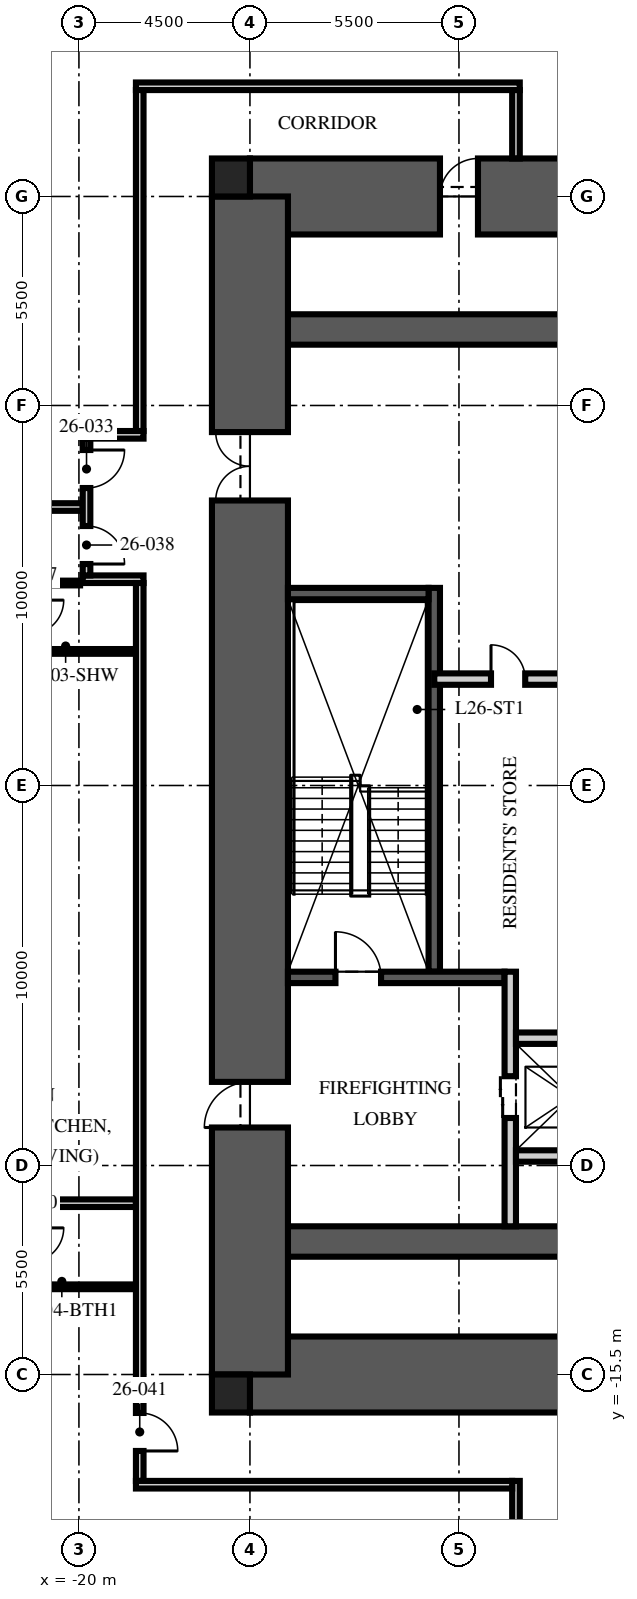
"""IFC4 building model, lengths in metres.
Left out: names, types, materials, properties, quantities, classifications, styles, units other than length and angle.
Written with IfcOpenShell. Run it as: python <this file> out.ifc"""

import sys

from ifc_helpers import new_model, si_unit, direction, frame, frame_2d, origin, origin_2d, place, context, subcontext, project, spatial, rectangle, extrude, element, fill, save


model = new_model("IFC4")
c1 = context("Model", 3, precision=1e-05, world=origin(), true_north=direction((0.0, 1.0)))
c2 = subcontext(c1, "Body", "Model", "MODEL_VIEW")
j1 = project(units=[si_unit("LENGTHUNIT", "METRE"), si_unit("PLANEANGLEUNIT", "RADIAN")], contexts=[c1])
p1 = place(None, origin())
s1 = spatial("IfcSite", under=j1, at=p1, CompositionType="ELEMENT")
p2 = place(p1, origin())
s2 = spatial("IfcBuilding", under=s1, at=p2, CompositionType="ELEMENT")
p3 = place(p2, frame((0.0, 0.0, 107.25)))
s3 = spatial("IfcBuildingStorey", under=s2, at=p3, CompositionType="ELEMENT", Elevation=107.25)
p4 = place(p3, frame((-15.5, 15.5, -0.25), z_axis=(0.0, 0.0, 1.0), x_axis=(1.0, 0.0, 0.0)))
e1 = element("IfcWall", 1, at=p4, inside=s3, PredefinedType="SHEAR", context=c2, shape_type="SweptSolid", body=[
    extrude(rectangle(XDim=31.0, YDim=2.0, at=frame_2d((15.5, 0.0))), origin(), (0.0, 0.0, 1.0), 3.75),
])
p5 = place(p4, frame((5.0, 0.0, 0.25)))
e2 = element("IfcOpeningElement", 2, at=p5, cuts=e1, PredefinedType="OPENING", context=c2, shape_type="SweptSolid", body=[
    extrude(rectangle(XDim=1.0, YDim=2.1, at=frame_2d((0.5, 1.05))), frame((0.0, 1.01, 0.0), z_axis=(0.0, -1.0, 0.0), x_axis=(1.0, 0.0, 0.0)), (0.0, 0.0, 1.0), 2.02),
])
p6 = place(p3, frame((-15.5, -15.5, -0.25), z_axis=(0.0, 0.0, 1.0), x_axis=(1.0, 0.0, 0.0)))
e3 = element("IfcWall", 3, at=p6, inside=s3, PredefinedType="SHEAR", context=c2, shape_type="SweptSolid", body=[
    extrude(rectangle(XDim=31.0, YDim=2.0, at=frame_2d((15.5, 0.0))), origin(), (0.0, 0.0, 1.0), 3.75),
])
p7 = place(p6, frame((10.4, 0.0, 0.25)))
e4 = element("IfcOpeningElement", 4, at=p7, cuts=e3, PredefinedType="OPENING", context=c2, shape_type="SweptSolid", body=[
    extrude(rectangle(XDim=1.1, YDim=2.1, at=frame_2d((0.55, 1.05))), frame((0.0, 1.01, 0.0), z_axis=(0.0, -1.0, 0.0), x_axis=(1.0, 0.0, 0.0)), (0.0, 0.0, 1.0), 2.02),
])
p8 = place(p6, frame((13.5, 0.0, 0.25)))
e5 = element("IfcOpeningElement", 5, at=p8, cuts=e3, PredefinedType="OPENING", context=c2, shape_type="SweptSolid", body=[
    extrude(rectangle(XDim=1.1, YDim=2.1, at=frame_2d((0.55, 1.05))), frame((0.0, 1.01, 0.0), z_axis=(0.0, -1.0, 0.0), x_axis=(1.0, 0.0, 0.0)), (0.0, 0.0, 1.0), 2.02),
])
p9 = place(p6, frame((16.6, 0.0, 0.25)))
e6 = element("IfcOpeningElement", 6, at=p9, cuts=e3, PredefinedType="OPENING", context=c2, shape_type="SweptSolid", body=[
    extrude(rectangle(XDim=1.1, YDim=2.1, at=frame_2d((0.55, 1.05))), frame((0.0, 1.01, 0.0), z_axis=(0.0, -1.0, 0.0), x_axis=(1.0, 0.0, 0.0)), (0.0, 0.0, 1.0), 2.02),
])
for number, where, z_axis, x_axis in (
    (7, (-15.5, 12.0, -0.25), (0.0, 0.0, 1.0), (1.0, 0.0, 0.0)),
    (8, (-15.5, -12.0, -0.25), (0.0, 0.0, 1.0), (1.0, 0.0, 0.0)),
):
    element("IfcWall", number, at=place(p3, frame(where, z_axis=z_axis, x_axis=x_axis)), inside=s3, PredefinedType="SHEAR", context=c2, shape_type="SweptSolid", body=[
        extrude(rectangle(XDim=31.0, YDim=0.8, at=frame_2d((15.5, 0.0))), origin(), (0.0, 0.0, 1.0), 3.75),
    ])
p10 = place(p3, frame((-15.5, -15.5, -0.25), z_axis=(0.0, 0.0, 1.0), x_axis=(0.0, 1.0, 0.0)))
e9 = element("IfcWall", 9, at=p10, inside=s3, PredefinedType="SHEAR", context=c2, shape_type="SweptSolid", body=[
    extrude(rectangle(XDim=31.0, YDim=2.0, at=frame_2d((15.5, 0.0))), origin(), (0.0, 0.0, 1.0), 3.75),
])
p11 = place(p10, frame((6.5, 0.0, 0.25)))
e10 = element("IfcOpeningElement", 10, at=p11, cuts=e9, PredefinedType="OPENING", context=c2, shape_type="SweptSolid", body=[
    extrude(rectangle(XDim=1.2, YDim=2.1, at=frame_2d((0.6, 1.05))), frame((0.0, 1.01, 0.0), z_axis=(0.0, -1.0, 0.0), x_axis=(1.0, 0.0, 0.0)), (0.0, 0.0, 1.0), 2.02),
])
p12 = place(p10, frame((23.0, 0.0, 0.25)))
e11 = element("IfcOpeningElement", 11, at=p12, cuts=e9, PredefinedType="OPENING", context=c2, shape_type="SweptSolid", body=[
    extrude(rectangle(XDim=1.8, YDim=2.1, at=frame_2d((0.9, 1.05))), frame((0.0, 1.01, 0.0), z_axis=(0.0, -1.0, 0.0), x_axis=(1.0, 0.0, 0.0)), (0.0, 0.0, 1.0), 2.02),
])
for number, where, z_axis, x_axis in (
    (12, (-16.0, 16.0, -0.25), (0.0, 0.0, 1.0), (1.0, 0.0, 0.0)),
    (13, (-16.0, -16.0, -0.25), (0.0, 0.0, 1.0), (1.0, 0.0, 0.0)),
):
    element("IfcColumn", number, at=place(p3, frame(where, z_axis=z_axis, x_axis=x_axis)), inside=s3, PredefinedType="COLUMN", context=c2, shape_type="SweptSolid", body=[
        extrude(rectangle(XDim=1.0, YDim=1.0, at=origin_2d()), origin(), (0.0, 0.0, 1.0), 3.75),
    ])
p13 = place(p3, frame((-10.65, -4.9, 0.0), z_axis=(0.0, 0.0, 1.0), x_axis=(0.0, 1.0, 0.0)))
e14 = element("IfcWall", 14, at=p13, inside=s3, PredefinedType="SOLIDWALL", context=c2, shape_type="SweptSolid", body=[
    extrude(rectangle(XDim=10.1, YDim=0.3, at=frame_2d((5.05, 0.0))), origin(), (0.0, 0.0, 1.0), 3.5),
])
p14 = place(p3, frame((-14.5, -5.05, 0.0), z_axis=(0.0, 0.0, 1.0), x_axis=(1.0, 0.0, 0.0)))
e15 = element("IfcWall", 15, at=p14, inside=s3, PredefinedType="SOLIDWALL", context=c2, shape_type="SweptSolid", body=[
    extrude(rectangle(XDim=5.7, YDim=0.3, at=frame_2d((2.85, 0.0))), origin(), (0.0, 0.0, 1.0), 3.5),
])
p15 = place(p14, frame((1.25, 0.0, 0.0)))
e16 = element("IfcOpeningElement", 16, at=p15, cuts=e15, PredefinedType="OPENING", context=c2, shape_type="SweptSolid", body=[
    extrude(rectangle(XDim=1.2, YDim=2.1, at=frame_2d((0.6, 1.05))), frame((0.0, 0.16, 0.0), z_axis=(0.0, -1.0, 0.0), x_axis=(1.0, 0.0, 0.0)), (0.0, 0.0, 1.0), 0.32),
])
p16 = place(p3, frame((-14.5, 5.05, 0.0), z_axis=(0.0, 0.0, 1.0), x_axis=(1.0, 0.0, 0.0)))
e17 = element("IfcWall", 17, at=p16, inside=s3, PredefinedType="SOLIDWALL", context=c2, shape_type="SweptSolid", body=[
    extrude(rectangle(XDim=3.7, YDim=0.3, at=frame_2d((1.85, 0.0))), origin(), (0.0, 0.0, 1.0), 3.5),
])
p17 = place(p3, frame((-8.65, -11.6, 0.0), z_axis=(0.0, 0.0, 1.0), x_axis=(0.0, 1.0, 0.0)))
e18 = element("IfcWall", 18, at=p17, inside=s3, PredefinedType="PARTITIONING", context=c2, shape_type="SweptSolid", body=[
    extrude(rectangle(XDim=6.7, YDim=0.3, at=frame_2d((3.35, 0.0))), origin(), (0.0, 0.0, 1.0), 3.5),
])
p18 = place(p17, frame((2.85, 0.0, 0.0)))
e19 = element("IfcOpeningElement", 19, at=p18, cuts=e18, PredefinedType="OPENING", context=c2, shape_type="SweptSolid", body=[
    extrude(rectangle(XDim=1.1, YDim=2.1, at=frame_2d((0.55, 1.05))), frame((0.0, 0.16, 0.0), z_axis=(0.0, -1.0, 0.0), x_axis=(1.0, 0.0, 0.0)), (0.0, 0.0, 1.0), 0.32),
])
p19 = place(p3, frame((-8.5, -6.65, 0.0), z_axis=(0.0, 0.0, 1.0), x_axis=(1.0, 0.0, 0.0)))
e20 = element("IfcWall", 20, at=p19, inside=s3, PredefinedType="PARTITIONING", context=c2, shape_type="SweptSolid", body=[
    extrude(rectangle(XDim=17.0, YDim=0.3, at=frame_2d((8.5, 0.0))), origin(), (0.0, 0.0, 1.0), 3.5),
])
p20 = place(p19, frame((7.8, 0.0, 0.0)))
e21 = element("IfcOpeningElement", 21, at=p20, cuts=e20, PredefinedType="OPENING", context=c2, shape_type="SweptSolid", body=[
    extrude(rectangle(XDim=1.3, YDim=2.4, at=frame_2d((0.65, 1.2))), frame((0.0, 0.16, 0.0), z_axis=(0.0, -1.0, 0.0), x_axis=(1.0, 0.0, 0.0)), (0.0, 0.0, 1.0), 0.32),
])
p21 = place(p19, frame((5.65, 0.0, 0.0)))
e22 = element("IfcOpeningElement", 22, at=p21, cuts=e20, PredefinedType="OPENING", context=c2, shape_type="SweptSolid", body=[
    extrude(rectangle(XDim=0.9, YDim=2.1, at=frame_2d((0.45, 1.05))), frame((0.0, 0.16, 0.0), z_axis=(0.0, -1.0, 0.0), x_axis=(1.0, 0.0, 0.0)), (0.0, 0.0, 1.0), 0.32),
])
p22 = place(p19, frame((10.4, 0.0, 0.0)))
e23 = element("IfcOpeningElement", 23, at=p22, cuts=e20, PredefinedType="OPENING", context=c2, shape_type="SweptSolid", body=[
    extrude(rectangle(XDim=0.9, YDim=2.1, at=frame_2d((0.45, 1.05))), frame((0.0, 0.16, 0.0), z_axis=(0.0, -1.0, 0.0), x_axis=(1.0, 0.0, 0.0)), (0.0, 0.0, 1.0), 0.32),
])
p23 = place(p3, frame((-8.5, -9.75, 0.0), z_axis=(0.0, 0.0, 1.0), x_axis=(1.0, 0.0, 0.0)))
e24 = element("IfcWall", 24, at=p23, inside=s3, PredefinedType="PARTITIONING", context=c2, shape_type="SweptSolid", body=[
    extrude(rectangle(XDim=2.9, YDim=0.3, at=frame_2d((1.45, 0.0))), origin(), (0.0, 0.0, 1.0), 3.5),
])
p24 = place(p3, frame((-10.65, 2.8, 0.0), z_axis=(0.0, 0.0, 1.0), x_axis=(1.0, 0.0, 0.0)))
e25 = element("IfcWall", 25, at=p24, inside=s3, PredefinedType="PARTITIONING", context=c2, shape_type="SweptSolid", body=[
    extrude(rectangle(XDim=21.3, YDim=0.3, at=frame_2d((10.65, 0.0))), origin(), (0.0, 0.0, 1.0), 3.5),
])
p25 = place(p24, frame((10.05, 0.0, 0.0)))
e26 = element("IfcOpeningElement", 26, at=p25, cuts=e25, PredefinedType="OPENING", context=c2, shape_type="SweptSolid", body=[
    extrude(rectangle(XDim=1.2, YDim=2.1, at=frame_2d((0.6, 1.05))), frame((0.0, 0.16, 0.0), z_axis=(0.0, -1.0, 0.0), x_axis=(1.0, 0.0, 0.0)), (0.0, 0.0, 1.0), 0.32),
])
p26 = place(p24, frame((1.493, 0.0, 0.0)))
e27 = element("IfcOpeningElement", 27, at=p26, cuts=e25, PredefinedType="OPENING", context=c2, shape_type="SweptSolid", body=[
    extrude(rectangle(XDim=0.9, YDim=2.1, at=frame_2d((0.45, 1.05))), frame((0.0, 0.16, 0.0), z_axis=(0.0, -1.0, 0.0), x_axis=(1.0, 0.0, 0.0)), (0.0, 0.0, 1.0), 0.32),
])
p27 = place(p24, frame((18.836, 0.0, 0.0)))
e28 = element("IfcOpeningElement", 28, at=p27, cuts=e25, PredefinedType="OPENING", context=c2, shape_type="SweptSolid", body=[
    extrude(rectangle(XDim=0.9, YDim=2.1, at=frame_2d((0.45, 1.05))), frame((0.0, 0.16, 0.0), z_axis=(0.0, -1.0, 0.0), x_axis=(1.0, 0.0, 0.0)), (0.0, 0.0, 1.0), 0.32),
])
p28 = place(p3, frame((-18.5, 18.4, 0.0), z_axis=(0.0, 0.0, 1.0), x_axis=(1.0, 0.0, 0.0)))
e29 = element("IfcWall", 29, at=p28, inside=s3, PredefinedType="PARTITIONING", context=c2, shape_type="SweptSolid", body=[
    extrude(rectangle(XDim=10.1, YDim=0.2, at=frame_2d((5.05, 0.0))), origin(), (0.0, 0.0, 1.0), 2.3),
])
p29 = place(p3, frame((-8.5, 18.3, 0.0), z_axis=(0.0, 0.0, 1.0), x_axis=(0.0, -1.0, 0.0)))
e30 = element("IfcWall", 30, at=p29, inside=s3, PredefinedType="PARTITIONING", context=c2, shape_type="SweptSolid", body=[
    extrude(rectangle(XDim=1.8, YDim=0.2, at=frame_2d((0.9, 0.0))), origin(), (0.0, 0.0, 1.0), 3.5),
])
p30 = place(p3, frame((-19.9, 7.328, 0.0), z_axis=(0.0, 0.0, 1.0), x_axis=(-1.0, 0.0, 0.0)))
e31 = element("IfcWall", 31, at=p30, inside=s3, PredefinedType="PARTITIONING", context=c2, shape_type="SweptSolid", body=[
    extrude(rectangle(XDim=9.25, YDim=0.2, at=frame_2d((4.625, 0.0))), origin(), (0.0, 0.0, 1.0), 2.81),
])
p31 = place(p3, frame((-18.5, -10.992, 0.0), z_axis=(0.0, 0.0, 1.0), x_axis=(-1.0, 0.0, 0.0)))
e32 = element("IfcWall", 32, at=p31, inside=s3, PredefinedType="PARTITIONING", context=c2, shape_type="SweptSolid", body=[
    extrude(rectangle(XDim=10.65, YDim=0.2, at=frame_2d((5.325, 0.0))), origin(), (0.0, 0.0, 1.0), 2.81),
])
p32 = place(p3, frame((-19.97, 5.328, 0.0), z_axis=(0.0, 0.0, 1.0), x_axis=(-1.0, 0.0, 0.0)))
e33 = element("IfcWall", 33, at=p32, inside=s3, PredefinedType="PARTITIONING", context=c2, shape_type="SweptSolid", body=[
    extrude(rectangle(XDim=1.33, YDim=0.125, at=frame_2d((0.665, 0.0))), origin(), (0.0, 0.0, 1.0), 3.5),
])
for number, where, z_axis, x_axis in (
    (34, (-18.5, 3.528, 0.0), (0.0, 0.0, 1.0), (-1.0, 0.0, 0.0)),
    (35, (-18.5, -13.192, 0.0), (0.0, 0.0, 1.0), (-1.0, 0.0, 0.0)),
):
    element("IfcWall", number, at=place(p3, frame(where, z_axis=z_axis, x_axis=x_axis)), inside=s3, PredefinedType="PARTITIONING", context=c2, shape_type="SweptSolid", body=[
        extrude(rectangle(XDim=2.8, YDim=0.125, at=frame_2d((1.4, 0.0))), origin(), (0.0, 0.0, 1.0), 3.5),
    ])
p33 = place(p3, frame((-18.4, 18.3, 0.0), z_axis=(0.0, 0.0, 1.0), x_axis=(0.0, -1.0, 0.0)))
e36 = element("IfcWall", 36, at=p33, inside=s3, PredefinedType="PARTITIONING", context=c2, shape_type="SweptSolid", body=[
    extrude(rectangle(XDim=8.972, YDim=0.2, at=frame_2d((4.486, 0.0))), origin(), (0.0, 0.0, 1.0), 2.3),
])
p34 = place(p3, frame((-18.3, 9.228, 0.0), z_axis=(0.0, 0.0, 1.0), x_axis=(-1.0, 0.0, 0.0)))
e37 = element("IfcWall", 37, at=p34, inside=s3, PredefinedType="PARTITIONING", context=c2, shape_type="SweptSolid", body=[
    extrude(rectangle(XDim=1.6, YDim=0.2, at=frame_2d((0.8, 0.0))), origin(), (0.0, 0.0, 1.0), 2.7),
])
p35 = place(p3, frame((-18.3, 5.428, 0.0), z_axis=(0.0, 0.0, 1.0), x_axis=(-1.0, 0.0, 0.0)))
e38 = element("IfcWall", 38, at=p35, inside=s3, PredefinedType="PARTITIONING", context=c2, shape_type="SweptSolid", body=[
    extrude(rectangle(XDim=1.6, YDim=0.2, at=frame_2d((0.8, 0.0))), origin(), (0.0, 0.0, 1.0), 3.5),
])
p36 = place(p3, frame((-19.8, 9.128, 0.0), z_axis=(0.0, 0.0, 1.0), x_axis=(0.0, -1.0, 0.0)))
e39 = element("IfcWall", 39, at=p36, inside=s3, PredefinedType="PARTITIONING", context=c2, shape_type="SweptSolid", body=[
    extrude(rectangle(XDim=3.6, YDim=0.2, at=frame_2d((1.8, 0.0))), origin(), (0.0, 0.0, 1.0), 2.7),
])
p37 = place(p36, frame((0.3, 0.0, 0.0)))
e40 = element("IfcOpeningElement", 40, at=p37, cuts=e39, PredefinedType="OPENING", context=c2, shape_type="SweptSolid", body=[
    extrude(rectangle(XDim=1.0, YDim=2.2, at=frame_2d((0.5, 1.1))), frame((0.0, 0.11, 0.0), z_axis=(0.0, -1.0, 0.0), x_axis=(1.0, 0.0, 0.0)), (0.0, 0.0, 1.0), 0.22),
])
p38 = place(p36, frame((2.3, 0.0, 0.0)))
e41 = element("IfcOpeningElement", 41, at=p38, cuts=e39, PredefinedType="OPENING", context=c2, shape_type="SweptSolid", body=[
    extrude(rectangle(XDim=1.0, YDim=2.2, at=frame_2d((0.5, 1.1))), frame((0.0, 0.11, 0.0), z_axis=(0.0, -1.0, 0.0), x_axis=(1.0, 0.0, 0.0)), (0.0, 0.0, 1.0), 0.22),
])
p39 = place(p3, frame((-18.4, 5.328, 0.0), z_axis=(0.0, 0.0, 1.0), x_axis=(0.0, -1.0, 0.0)))
e42 = element("IfcWall", 42, at=p39, inside=s3, PredefinedType="PARTITIONING", context=c2, shape_type="SweptSolid", body=[
    extrude(rectangle(XDim=23.628, YDim=0.2, at=frame_2d((11.814, 0.0))), origin(), (0.0, 0.0, 1.0), 2.3),
])
p40 = place(p39, frame((21.84, 0.0, 0.0)))
e43 = element("IfcOpeningElement", 43, at=p40, cuts=e42, PredefinedType="OPENING", context=c2, shape_type="SweptSolid", body=[
    extrude(rectangle(XDim=1.0, YDim=2.2, at=frame_2d((0.5, 1.1))), frame((0.0, 0.11, 0.0), z_axis=(0.0, -1.0, 0.0), x_axis=(1.0, 0.0, 0.0)), (0.0, 0.0, 1.0), 0.22),
])
p41 = place(p3, frame((-8.5, -18.3, 0.0), z_axis=(0.0, 0.0, 1.0), x_axis=(0.0, -1.0, 0.0)))
e44 = element("IfcWall", 44, at=p41, inside=s3, PredefinedType="PARTITIONING", context=c2, shape_type="SweptSolid", body=[
    extrude(rectangle(XDim=3.0, YDim=0.2, at=frame_2d((1.5, 0.0))), origin(), (0.0, 0.0, 1.0), 3.5),
])
p42 = place(p3, frame((-8.6, -18.4, 0.0), z_axis=(0.0, 0.0, 1.0), x_axis=(-1.0, 0.0, 0.0)))
e45 = element("IfcWall", 45, at=p42, inside=s3, PredefinedType="PARTITIONING", context=c2, shape_type="SweptSolid", body=[
    extrude(rectangle(XDim=9.9, YDim=0.2, at=frame_2d((4.95, 0.0))), origin(), (0.0, 0.0, 1.0), 2.3),
])
p43 = place(p15, origin())
e46 = element("IfcDoor", 46, at=p43, inside=s3, OperationType="SINGLE_SWING_LEFT", PredefinedType="DOOR", context=c2, shape_type="SweptSolid", body=[
    extrude(rectangle(XDim=1.2, YDim=2.1, at=frame_2d((0.6, 1.05))), frame((0.0, 0.025, 0.0), z_axis=(0.0, -1.0, 0.0), x_axis=(1.0, 0.0, 0.0)), (0.0, 0.0, 1.0), 0.05),
])
fill(e16, e46)
p44 = place(p11, origin())
e47 = element("IfcDoor", 47, at=p44, inside=s3, OperationType="SINGLE_SWING_LEFT", PredefinedType="DOOR", context=c2, shape_type="SweptSolid", body=[
    extrude(rectangle(XDim=1.2, YDim=2.1, at=frame_2d((0.6, 1.05))), frame((0.0, 0.025, 0.0), z_axis=(0.0, -1.0, 0.0), x_axis=(1.0, 0.0, 0.0)), (0.0, 0.0, 1.0), 0.05),
])
fill(e10, e47)
p45 = place(p12, origin())
e48 = element("IfcDoor", 48, at=p45, inside=s3, OperationType="DOUBLE_DOOR_SINGLE_SWING", PredefinedType="DOOR", context=c2, shape_type="SweptSolid", body=[
    extrude(rectangle(XDim=1.8, YDim=2.1, at=frame_2d((0.9, 1.05))), frame((0.0, 0.025, 0.0), z_axis=(0.0, -1.0, 0.0), x_axis=(1.0, 0.0, 0.0)), (0.0, 0.0, 1.0), 0.05),
])
fill(e11, e48)
p46 = place(p18, origin())
e49 = element("IfcDoor", 49, at=p46, inside=s3, OperationType="DOUBLE_DOOR_SLIDING", PredefinedType="DOOR", context=c2, shape_type="SweptSolid", body=[
    extrude(rectangle(XDim=1.1, YDim=2.1, at=frame_2d((0.55, 1.05))), frame((0.0, 0.025, 0.0), z_axis=(0.0, -1.0, 0.0), x_axis=(1.0, 0.0, 0.0)), (0.0, 0.0, 1.0), 0.05),
])
fill(e19, e49)
p47 = place(p26, origin())
e50 = element("IfcDoor", 50, at=p47, inside=s3, OperationType="SINGLE_SWING_LEFT", PredefinedType="DOOR", context=c2, shape_type="SweptSolid", body=[
    extrude(rectangle(XDim=0.9, YDim=2.1, at=frame_2d((0.45, 1.05))), frame((0.0, 0.025, 0.0), z_axis=(0.0, -1.0, 0.0), x_axis=(1.0, 0.0, 0.0)), (0.0, 0.0, 1.0), 0.05),
])
fill(e27, e50)
p48 = place(p5, origin())
e51 = element("IfcDoor", 51, at=p48, inside=s3, OperationType="SINGLE_SWING_RIGHT", PredefinedType="DOOR", context=c2, shape_type="SweptSolid", body=[
    extrude(rectangle(XDim=1.0, YDim=2.1, at=frame_2d((0.5, 1.05))), frame((0.0, 0.025, 0.0), z_axis=(0.0, -1.0, 0.0), x_axis=(1.0, 0.0, 0.0)), (0.0, 0.0, 1.0), 0.05),
])
fill(e2, e51)
p49 = place(p37, origin())
e52 = element("IfcDoor", 52, at=p49, inside=s3, OperationType="SINGLE_SWING_LEFT", PredefinedType="DOOR", context=c2, shape_type="SweptSolid", body=[
    extrude(rectangle(XDim=1.0, YDim=2.2, at=frame_2d((0.5, 1.1))), frame((0.0, 0.025, 0.0), z_axis=(0.0, -1.0, 0.0), x_axis=(1.0, 0.0, 0.0)), (0.0, 0.0, 1.0), 0.05),
])
fill(e40, e52)
p50 = place(p38, origin())
e53 = element("IfcDoor", 53, at=p50, inside=s3, OperationType="SINGLE_SWING_RIGHT", PredefinedType="DOOR", context=c2, shape_type="SweptSolid", body=[
    extrude(rectangle(XDim=1.0, YDim=2.2, at=frame_2d((0.5, 1.1))), frame((0.0, 0.025, 0.0), z_axis=(0.0, -1.0, 0.0), x_axis=(1.0, 0.0, 0.0)), (0.0, 0.0, 1.0), 0.05),
])
fill(e41, e53)
p51 = place(p40, origin())
e54 = element("IfcDoor", 54, at=p51, inside=s3, OperationType="SINGLE_SWING_RIGHT", PredefinedType="DOOR", context=c2, shape_type="SweptSolid", body=[
    extrude(rectangle(XDim=1.0, YDim=2.2, at=frame_2d((0.5, 1.1))), frame((0.0, 0.025, 0.0), z_axis=(0.0, -1.0, 0.0), x_axis=(1.0, 0.0, 0.0)), (0.0, 0.0, 1.0), 0.05),
])
fill(e43, e54)
save(model, sys.argv[1])
